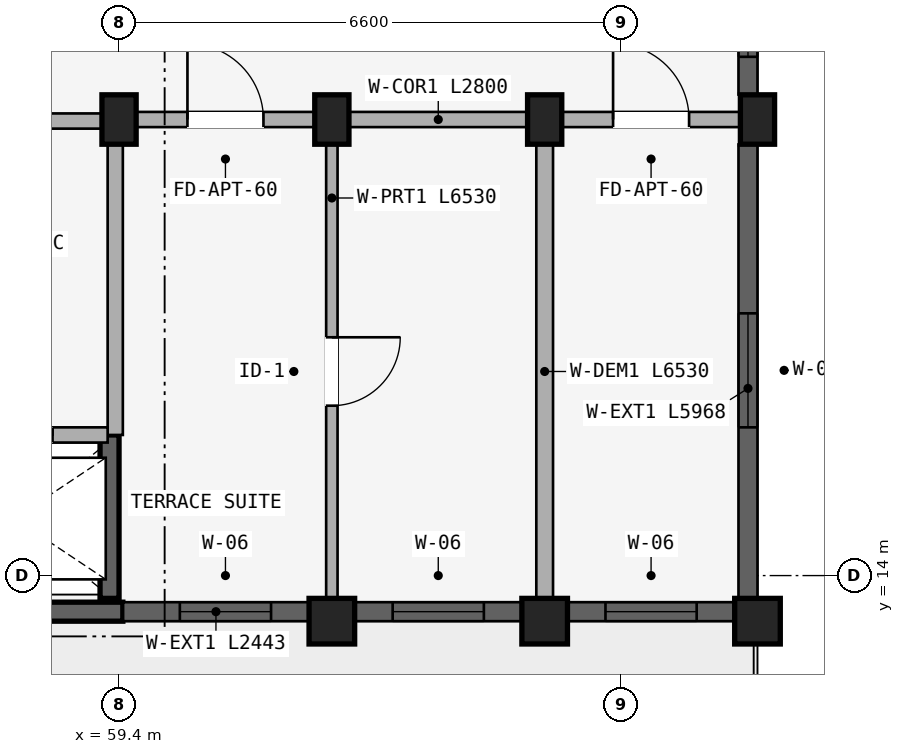
"""IFC4 building model, lengths in metres.
Left out: names, types, materials, properties, quantities, classifications, styles, units other than length and angle.
Written with IfcOpenShell. Run it as: python <this file> out.ifc"""

import sys

from ifc_helpers import new_model, si_unit, direction, frame, frame_2d, origin, origin_2d, place, context, subcontext, project, spatial, rectangle, extrude, element, fill, save


model = new_model("IFC4")
c1 = context("Model", 3, precision=1e-05, world=origin(), true_north=direction((0.0, 1.0)))
c2 = subcontext(c1, "Body", "Model", "MODEL_VIEW")
j1 = project(units=[si_unit("LENGTHUNIT", "METRE"), si_unit("PLANEANGLEUNIT", "RADIAN")], contexts=[c1])
p1 = place(None, origin())
s1 = spatial("IfcSite", under=j1, at=p1, CompositionType="ELEMENT")
p2 = place(p1, origin())
s2 = spatial("IfcBuilding", under=s1, at=p2, CompositionType="ELEMENT")
p3 = place(p2, frame((0.0, 0.0, 30.75)))
s3 = spatial("IfcBuildingStorey", under=s2, at=p3, CompositionType="ELEMENT", Elevation=30.75)
p4 = place(p3, frame((56.65, 13.525, 0.0), z_axis=(0.0, 0.0, 1.0), x_axis=(1.0, 0.0, 0.0)))
e1 = element("IfcWall", 1, at=p4, inside=s3, PredefinedType="SHEAR", context=c2, shape_type="SweptSolid", body=[
    extrude(rectangle(XDim=2.8, YDim=0.25, at=frame_2d((1.4, 0.0))), origin(), (0.0, 0.0, 1.0), 2.91),
])
p5 = place(p3, frame((59.275, 15.85, 0.0), z_axis=(0.0, 0.0, 1.0), x_axis=(0.0, -1.0, 0.0)))
e2 = element("IfcWall", 2, at=p5, inside=s3, PredefinedType="SHEAR", context=c2, shape_type="SweptSolid", body=[
    extrude(rectangle(XDim=2.15, YDim=0.25, at=frame_2d((1.075, 0.0))), origin(), (0.0, 0.0, 1.0), 2.91),
])
for number, where, z_axis, x_axis in (
    (3, (59.4, 20.0, 0.0), (0.0, 0.0, 1.0), (1.0, 0.0, 0.0)),
    (4, (62.2, 20.0, 0.0), (0.0, 0.0, 1.0), (1.0, 0.0, 0.0)),
):
    element("IfcColumn", number, at=place(p3, frame(where, z_axis=z_axis, x_axis=x_axis)), inside=s3, PredefinedType="COLUMN", context=c2, shape_type="SweptSolid", body=[
        extrude(rectangle(XDim=0.45, YDim=0.65, at=origin_2d()), origin(), (0.0, 0.0, 1.0), 2.91),
    ])
p6 = place(p3, frame((62.2, 13.4, 0.0), z_axis=(0.0, 0.0, 1.0), x_axis=(1.0, 0.0, 0.0)))
e5 = element("IfcColumn", 5, at=p6, inside=s3, PredefinedType="COLUMN", context=c2, shape_type="SweptSolid", body=[
    extrude(rectangle(XDim=0.6, YDim=0.6, at=origin_2d()), origin(), (0.0, 0.0, 1.0), 2.91),
])
p7 = place(p3, frame((65.0, 20.0, 0.0), z_axis=(0.0, 0.0, 1.0), x_axis=(1.0, 0.0, 0.0)))
e6 = element("IfcColumn", 6, at=p7, inside=s3, PredefinedType="COLUMN", context=c2, shape_type="SweptSolid", body=[
    extrude(rectangle(XDim=0.45, YDim=0.65, at=origin_2d()), origin(), (0.0, 0.0, 1.0), 2.91),
])
p8 = place(p3, frame((65.0, 13.4, 0.0), z_axis=(0.0, 0.0, 1.0), x_axis=(1.0, 0.0, 0.0)))
e7 = element("IfcColumn", 7, at=p8, inside=s3, PredefinedType="COLUMN", context=c2, shape_type="SweptSolid", body=[
    extrude(rectangle(XDim=0.6, YDim=0.6, at=origin_2d()), origin(), (0.0, 0.0, 1.0), 2.91),
])
p9 = place(p3, frame((67.8, 20.0, 0.0), z_axis=(0.0, 0.0, 1.0), x_axis=(1.0, 0.0, 0.0)))
e8 = element("IfcColumn", 8, at=p9, inside=s3, PredefinedType="COLUMN", context=c2, shape_type="SweptSolid", body=[
    extrude(rectangle(XDim=0.45, YDim=0.65, at=origin_2d()), origin(), (0.0, 0.0, 1.0), 2.91),
])
p10 = place(p3, frame((67.8, 13.4, 0.0), z_axis=(0.0, 0.0, 1.0), x_axis=(1.0, 0.0, 0.0)))
e9 = element("IfcColumn", 9, at=p10, inside=s3, PredefinedType="COLUMN", context=c2, shape_type="SweptSolid", body=[
    extrude(rectangle(XDim=0.6, YDim=0.6, at=origin_2d()), origin(), (0.0, 0.0, 1.0), 2.91),
])
p11 = place(p3, frame((53.7, 19.98, 0.0), z_axis=(0.0, 0.0, 1.0), x_axis=(1.0, 0.0, 0.0)))
e10 = element("IfcWall", 10, at=p11, inside=s3, PredefinedType="STANDARD", context=c2, shape_type="SweptSolid", body=[
    extrude(rectangle(XDim=5.65, YDim=0.2, at=frame_2d((2.825, 0.0))), origin(), (0.0, 0.0, 1.0), 2.352),
])
p12 = place(p11, frame((1.923, 0.0, 0.0)))
e11 = element("IfcOpeningElement", 11, at=p12, cuts=e10, PredefinedType="OPENING", context=c2, shape_type="SweptSolid", body=[
    extrude(rectangle(XDim=1.24, YDim=2.15, at=frame_2d((0.62, 1.075))), frame((0.0, 0.11, 0.0), z_axis=(0.0, -1.0, 0.0), x_axis=(1.0, 0.0, 0.0)), (0.0, 0.0, 1.0), 0.22),
])
p13 = place(p3, frame((59.35, 19.98, 0.0), z_axis=(0.0, 0.0, 1.0), x_axis=(0.0, -1.0, 0.0)))
e12 = element("IfcWall", 12, at=p13, inside=s3, PredefinedType="STANDARD", context=c2, shape_type="SweptSolid", body=[
    extrude(rectangle(XDim=4.13, YDim=0.2, at=frame_2d((2.065, 0.0))), origin(), (0.0, 0.0, 1.0), 2.352),
])
p14 = place(p3, frame((56.7, 15.85, 0.0), z_axis=(0.0, 0.0, 1.0), x_axis=(1.0, 0.0, 0.0)))
e13 = element("IfcWall", 13, at=p14, inside=s3, PredefinedType="STANDARD", context=c2, shape_type="SweptSolid", body=[
    extrude(rectangle(XDim=2.55, YDim=0.2, at=frame_2d((1.275, 0.0))), origin(), (0.0, 0.0, 1.0), 2.91),
])
p15 = place(p14, frame((0.725, 0.0, 0.0)))
e14 = element("IfcOpeningElement", 14, at=p15, cuts=e13, PredefinedType="OPENING", context=c2, shape_type="SweptSolid", body=[
    extrude(rectangle(XDim=1.1, YDim=2.15, at=frame_2d((0.55, 1.075))), frame((0.0, 0.11, 0.0), z_axis=(0.0, -1.0, 0.0), x_axis=(1.0, 0.0, 0.0)), (0.0, 0.0, 1.0), 0.22),
])
p16 = place(p3, frame((59.4, 20.0, 0.0), z_axis=(0.0, 0.0, 1.0), x_axis=(1.0, 0.0, 0.0)))
e15 = element("IfcWall", 15, at=p16, inside=s3, PredefinedType="STANDARD", context=c2, shape_type="SweptSolid", body=[
    extrude(rectangle(XDim=2.8, YDim=0.2, at=frame_2d((1.4, 0.0))), origin(), (0.0, 0.0, 1.0), 2.352),
])
p17 = place(p16, frame((0.9, 0.0, 0.0)))
e16 = element("IfcOpeningElement", 16, at=p17, cuts=e15, PredefinedType="OPENING", context=c2, shape_type="SweptSolid", body=[
    extrude(rectangle(XDim=1.0, YDim=2.15, at=frame_2d((0.5, 1.075))), frame((0.0, 0.11, 0.0), z_axis=(0.0, -1.0, 0.0), x_axis=(1.0, 0.0, 0.0)), (0.0, 0.0, 1.0), 0.22),
])
p18 = place(p3, frame((62.2, 20.0, 0.0), z_axis=(0.0, 0.0, 1.0), x_axis=(1.0, 0.0, 0.0)))
e17 = element("IfcWall", 17, at=p18, inside=s3, PredefinedType="STANDARD", context=c2, shape_type="SweptSolid", body=[
    extrude(rectangle(XDim=2.8, YDim=0.2, at=frame_2d((1.4, 0.0))), origin(), (0.0, 0.0, 1.0), 2.352),
])
p19 = place(p3, frame((65.0, 20.0, 0.0), z_axis=(0.0, 0.0, 1.0), x_axis=(1.0, 0.0, 0.0)))
e18 = element("IfcWall", 18, at=p19, inside=s3, PredefinedType="STANDARD", context=c2, shape_type="SweptSolid", body=[
    extrude(rectangle(XDim=2.8, YDim=0.2, at=frame_2d((1.4, 0.0))), origin(), (0.0, 0.0, 1.0), 2.352),
])
p20 = place(p19, frame((0.9, 0.0, 0.0)))
e19 = element("IfcOpeningElement", 19, at=p20, cuts=e18, PredefinedType="OPENING", context=c2, shape_type="SweptSolid", body=[
    extrude(rectangle(XDim=1.0, YDim=2.15, at=frame_2d((0.5, 1.075))), frame((0.0, 0.11, 0.0), z_axis=(0.0, -1.0, 0.0), x_axis=(1.0, 0.0, 0.0)), (0.0, 0.0, 1.0), 0.22),
])
p21 = place(p3, frame((62.2, 19.95, 0.0), z_axis=(0.0, 0.0, 1.0), x_axis=(0.0, -1.0, 0.0)))
e20 = element("IfcWall", 20, at=p21, inside=s3, PredefinedType="PARTITIONING", context=c2, shape_type="SweptSolid", body=[
    extrude(rectangle(XDim=6.53, YDim=0.15, at=frame_2d((3.265, 0.0))), origin(), (0.0, 0.0, 1.0), 2.352),
])
p22 = place(p21, frame((2.815, 0.0, 0.0)))
e21 = element("IfcOpeningElement", 21, at=p22, cuts=e20, PredefinedType="OPENING", context=c2, shape_type="SweptSolid", body=[
    extrude(rectangle(XDim=0.9, YDim=2.1, at=frame_2d((0.45, 1.05))), frame((0.0, 0.085, 0.0), z_axis=(0.0, -1.0, 0.0), x_axis=(1.0, 0.0, 0.0)), (0.0, 0.0, 1.0), 0.17),
])
p23 = place(p3, frame((65.0, 19.95, 0.0), z_axis=(0.0, 0.0, 1.0), x_axis=(0.0, -1.0, 0.0)))
e22 = element("IfcWall", 22, at=p23, inside=s3, PredefinedType="STANDARD", context=c2, shape_type="SweptSolid", body=[
    extrude(rectangle(XDim=6.53, YDim=0.22, at=frame_2d((3.265, 0.0))), origin(), (0.0, 0.0, 1.0), 2.352),
])
p24 = place(p3, frame((59.454, 13.525, 0.0), z_axis=(0.0, 0.0, 1.0), x_axis=(1.0, 0.0, 0.0)))
e23 = element("IfcWall", 23, at=p24, inside=s3, PredefinedType="STANDARD", context=c2, shape_type="SweptSolid", body=[
    extrude(rectangle(XDim=2.443, YDim=0.25, at=frame_2d((1.221, 0.0))), origin(), (0.0, 0.0, 1.0), 2.452),
])
p25 = place(p24, frame((0.747, 0.0, 0.752)))
e24 = element("IfcOpeningElement", 24, at=p25, cuts=e23, PredefinedType="OPENING", context=c2, shape_type="SweptSolid", body=[
    extrude(rectangle(XDim=1.2, YDim=1.5, at=frame_2d((0.6, 0.75))), frame((0.0, 0.135, 0.0), z_axis=(0.0, -1.0, 0.0), x_axis=(1.0, 0.0, 0.0)), (0.0, 0.0, 1.0), 0.27),
])
p26 = place(p3, frame((62.503, 13.525, 0.0), z_axis=(0.0, 0.0, 1.0), x_axis=(1.0, 0.0, 0.0)))
e25 = element("IfcWall", 25, at=p26, inside=s3, PredefinedType="STANDARD", context=c2, shape_type="SweptSolid", body=[
    extrude(rectangle(XDim=2.193, YDim=0.25, at=frame_2d((1.097, 0.0))), origin(), (0.0, 0.0, 1.0), 2.452),
])
p27 = place(p26, frame((0.497, 0.0, 0.752)))
e26 = element("IfcOpeningElement", 26, at=p27, cuts=e25, PredefinedType="OPENING", context=c2, shape_type="SweptSolid", body=[
    extrude(rectangle(XDim=1.2, YDim=1.5, at=frame_2d((0.6, 0.75))), frame((0.0, 0.135, 0.0), z_axis=(0.0, -1.0, 0.0), x_axis=(1.0, 0.0, 0.0)), (0.0, 0.0, 1.0), 0.27),
])
p28 = place(p3, frame((65.303, 13.525, 0.0), z_axis=(0.0, 0.0, 1.0), x_axis=(1.0, 0.0, 0.0)))
e27 = element("IfcWall", 27, at=p28, inside=s3, PredefinedType="STANDARD", context=c2, shape_type="SweptSolid", body=[
    extrude(rectangle(XDim=2.193, YDim=0.25, at=frame_2d((1.097, 0.0))), origin(), (0.0, 0.0, 1.0), 2.452),
])
p29 = place(p28, frame((0.497, 0.0, 0.752)))
e28 = element("IfcOpeningElement", 28, at=p29, cuts=e27, PredefinedType="OPENING", context=c2, shape_type="SweptSolid", body=[
    extrude(rectangle(XDim=1.2, YDim=1.5, at=frame_2d((0.6, 0.75))), frame((0.0, 0.135, 0.0), z_axis=(0.0, -1.0, 0.0), x_axis=(1.0, 0.0, 0.0)), (0.0, 0.0, 1.0), 0.27),
])
p30 = place(p3, frame((67.675, 22.072, 0.0), z_axis=(0.0, 0.0, 1.0), x_axis=(0.0, -1.0, 0.0)))
e29 = element("IfcWall", 29, at=p30, inside=s3, PredefinedType="STANDARD", context=c2, shape_type="SweptSolid", body=[
    extrude(rectangle(XDim=1.743, YDim=0.25, at=frame_2d((0.872, 0.0))), origin(), (0.0, 0.0, 1.0), 2.352),
])
p31 = place(p30, frame((0.497, 0.0, 0.88)))
e30 = element("IfcOpeningElement", 30, at=p31, cuts=e29, PredefinedType="OPENING", context=c2, shape_type="SweptSolid", body=[
    extrude(rectangle(XDim=0.75, YDim=1.05, at=frame_2d((0.375, 0.525))), frame((0.0, 0.135, 0.0), z_axis=(0.0, -1.0, 0.0), x_axis=(1.0, 0.0, 0.0)), (0.0, 0.0, 1.0), 0.27),
])
p32 = place(p3, frame((67.675, 19.671, 0.0), z_axis=(0.0, 0.0, 1.0), x_axis=(0.0, -1.0, 0.0)))
e31 = element("IfcWall", 31, at=p32, inside=s3, PredefinedType="STANDARD", context=c2, shape_type="SweptSolid", body=[
    extrude(rectangle(XDim=5.968, YDim=0.25, at=frame_2d((2.984, 0.0))), origin(), (0.0, 0.0, 1.0), 2.46),
])
p33 = place(p32, frame((2.221, 0.0, 0.61)))
e32 = element("IfcOpeningElement", 32, at=p33, cuts=e31, PredefinedType="OPENING", context=c2, shape_type="SweptSolid", body=[
    extrude(rectangle(XDim=1.5, YDim=1.65, at=frame_2d((0.75, 0.825))), frame((0.0, 0.135, 0.0), z_axis=(0.0, -1.0, 0.0), x_axis=(1.0, 0.0, 0.0)), (0.0, 0.0, 1.0), 0.27),
])
p34 = place(p25, origin())
e33 = element("IfcWindow", 33, at=p34, inside=s3, PartitioningType="SINGLE_PANEL", PredefinedType="WINDOW", context=c2, shape_type="SweptSolid", body=[
    extrude(rectangle(XDim=1.2, YDim=1.5, at=frame_2d((0.6, 0.75))), frame((0.0, 0.03, 0.0), z_axis=(0.0, -1.0, 0.0), x_axis=(1.0, 0.0, 0.0)), (0.0, 0.0, 1.0), 0.06),
])
fill(e24, e33)
p35 = place(p27, origin())
e34 = element("IfcWindow", 34, at=p35, inside=s3, PartitioningType="SINGLE_PANEL", PredefinedType="WINDOW", context=c2, shape_type="SweptSolid", body=[
    extrude(rectangle(XDim=1.2, YDim=1.5, at=frame_2d((0.6, 0.75))), frame((0.0, 0.03, 0.0), z_axis=(0.0, -1.0, 0.0), x_axis=(1.0, 0.0, 0.0)), (0.0, 0.0, 1.0), 0.06),
])
fill(e26, e34)
p36 = place(p29, origin())
e35 = element("IfcWindow", 35, at=p36, inside=s3, PartitioningType="SINGLE_PANEL", PredefinedType="WINDOW", context=c2, shape_type="SweptSolid", body=[
    extrude(rectangle(XDim=1.2, YDim=1.5, at=frame_2d((0.6, 0.75))), frame((0.0, 0.03, 0.0), z_axis=(0.0, -1.0, 0.0), x_axis=(1.0, 0.0, 0.0)), (0.0, 0.0, 1.0), 0.06),
])
fill(e28, e35)
p37 = place(p31, origin())
e36 = element("IfcWindow", 36, at=p37, inside=s3, PartitioningType="SINGLE_PANEL", PredefinedType="WINDOW", context=c2, shape_type="SweptSolid", body=[
    extrude(rectangle(XDim=0.75, YDim=1.05, at=frame_2d((0.375, 0.525))), frame((0.0, 0.03, 0.0), z_axis=(0.0, -1.0, 0.0), x_axis=(1.0, 0.0, 0.0)), (0.0, 0.0, 1.0), 0.06),
])
fill(e30, e36)
p38 = place(p33, origin())
e37 = element("IfcWindow", 37, at=p38, inside=s3, PartitioningType="DOUBLE_PANEL_VERTICAL", PredefinedType="WINDOW", context=c2, shape_type="SweptSolid", body=[
    extrude(rectangle(XDim=1.5, YDim=1.65, at=frame_2d((0.75, 0.825))), frame((0.0, 0.03, 0.0), z_axis=(0.0, -1.0, 0.0), x_axis=(1.0, 0.0, 0.0)), (0.0, 0.0, 1.0), 0.06),
])
fill(e32, e37)
p39 = place(p15, origin())
e38 = element("IfcDoor", 38, at=p39, inside=s3, OperationType="SLIDING_TO_LEFT", PredefinedType="DOOR", context=c2, shape_type="SweptSolid", body=[
    extrude(rectangle(XDim=1.1, YDim=2.15, at=frame_2d((0.55, 1.075))), frame((0.0, 0.025, 0.0), z_axis=(0.0, -1.0, 0.0), x_axis=(1.0, 0.0, 0.0)), (0.0, 0.0, 1.0), 0.05),
])
fill(e14, e38)
p40 = place(p17, origin())
e39 = element("IfcDoor", 39, at=p40, inside=s3, OperationType="SINGLE_SWING_LEFT", PredefinedType="DOOR", context=c2, shape_type="SweptSolid", body=[
    extrude(rectangle(XDim=1.0, YDim=2.15, at=frame_2d((0.5, 1.075))), frame((0.0, 0.025, 0.0), z_axis=(0.0, -1.0, 0.0), x_axis=(1.0, 0.0, 0.0)), (0.0, 0.0, 1.0), 0.05),
])
fill(e16, e39)
p41 = place(p20, origin())
e40 = element("IfcDoor", 40, at=p41, inside=s3, OperationType="SINGLE_SWING_LEFT", PredefinedType="DOOR", context=c2, shape_type="SweptSolid", body=[
    extrude(rectangle(XDim=1.0, YDim=2.15, at=frame_2d((0.5, 1.075))), frame((0.0, 0.025, 0.0), z_axis=(0.0, -1.0, 0.0), x_axis=(1.0, 0.0, 0.0)), (0.0, 0.0, 1.0), 0.05),
])
fill(e19, e40)
p42 = place(p22, origin())
e41 = element("IfcDoor", 41, at=p42, inside=s3, OperationType="SINGLE_SWING_LEFT", PredefinedType="DOOR", context=c2, shape_type="SweptSolid", body=[
    extrude(rectangle(XDim=0.9, YDim=2.1, at=frame_2d((0.45, 1.05))), frame((0.0, 0.025, 0.0), z_axis=(0.0, -1.0, 0.0), x_axis=(1.0, 0.0, 0.0)), (0.0, 0.0, 1.0), 0.05),
])
fill(e21, e41)
save(model, sys.argv[1])
